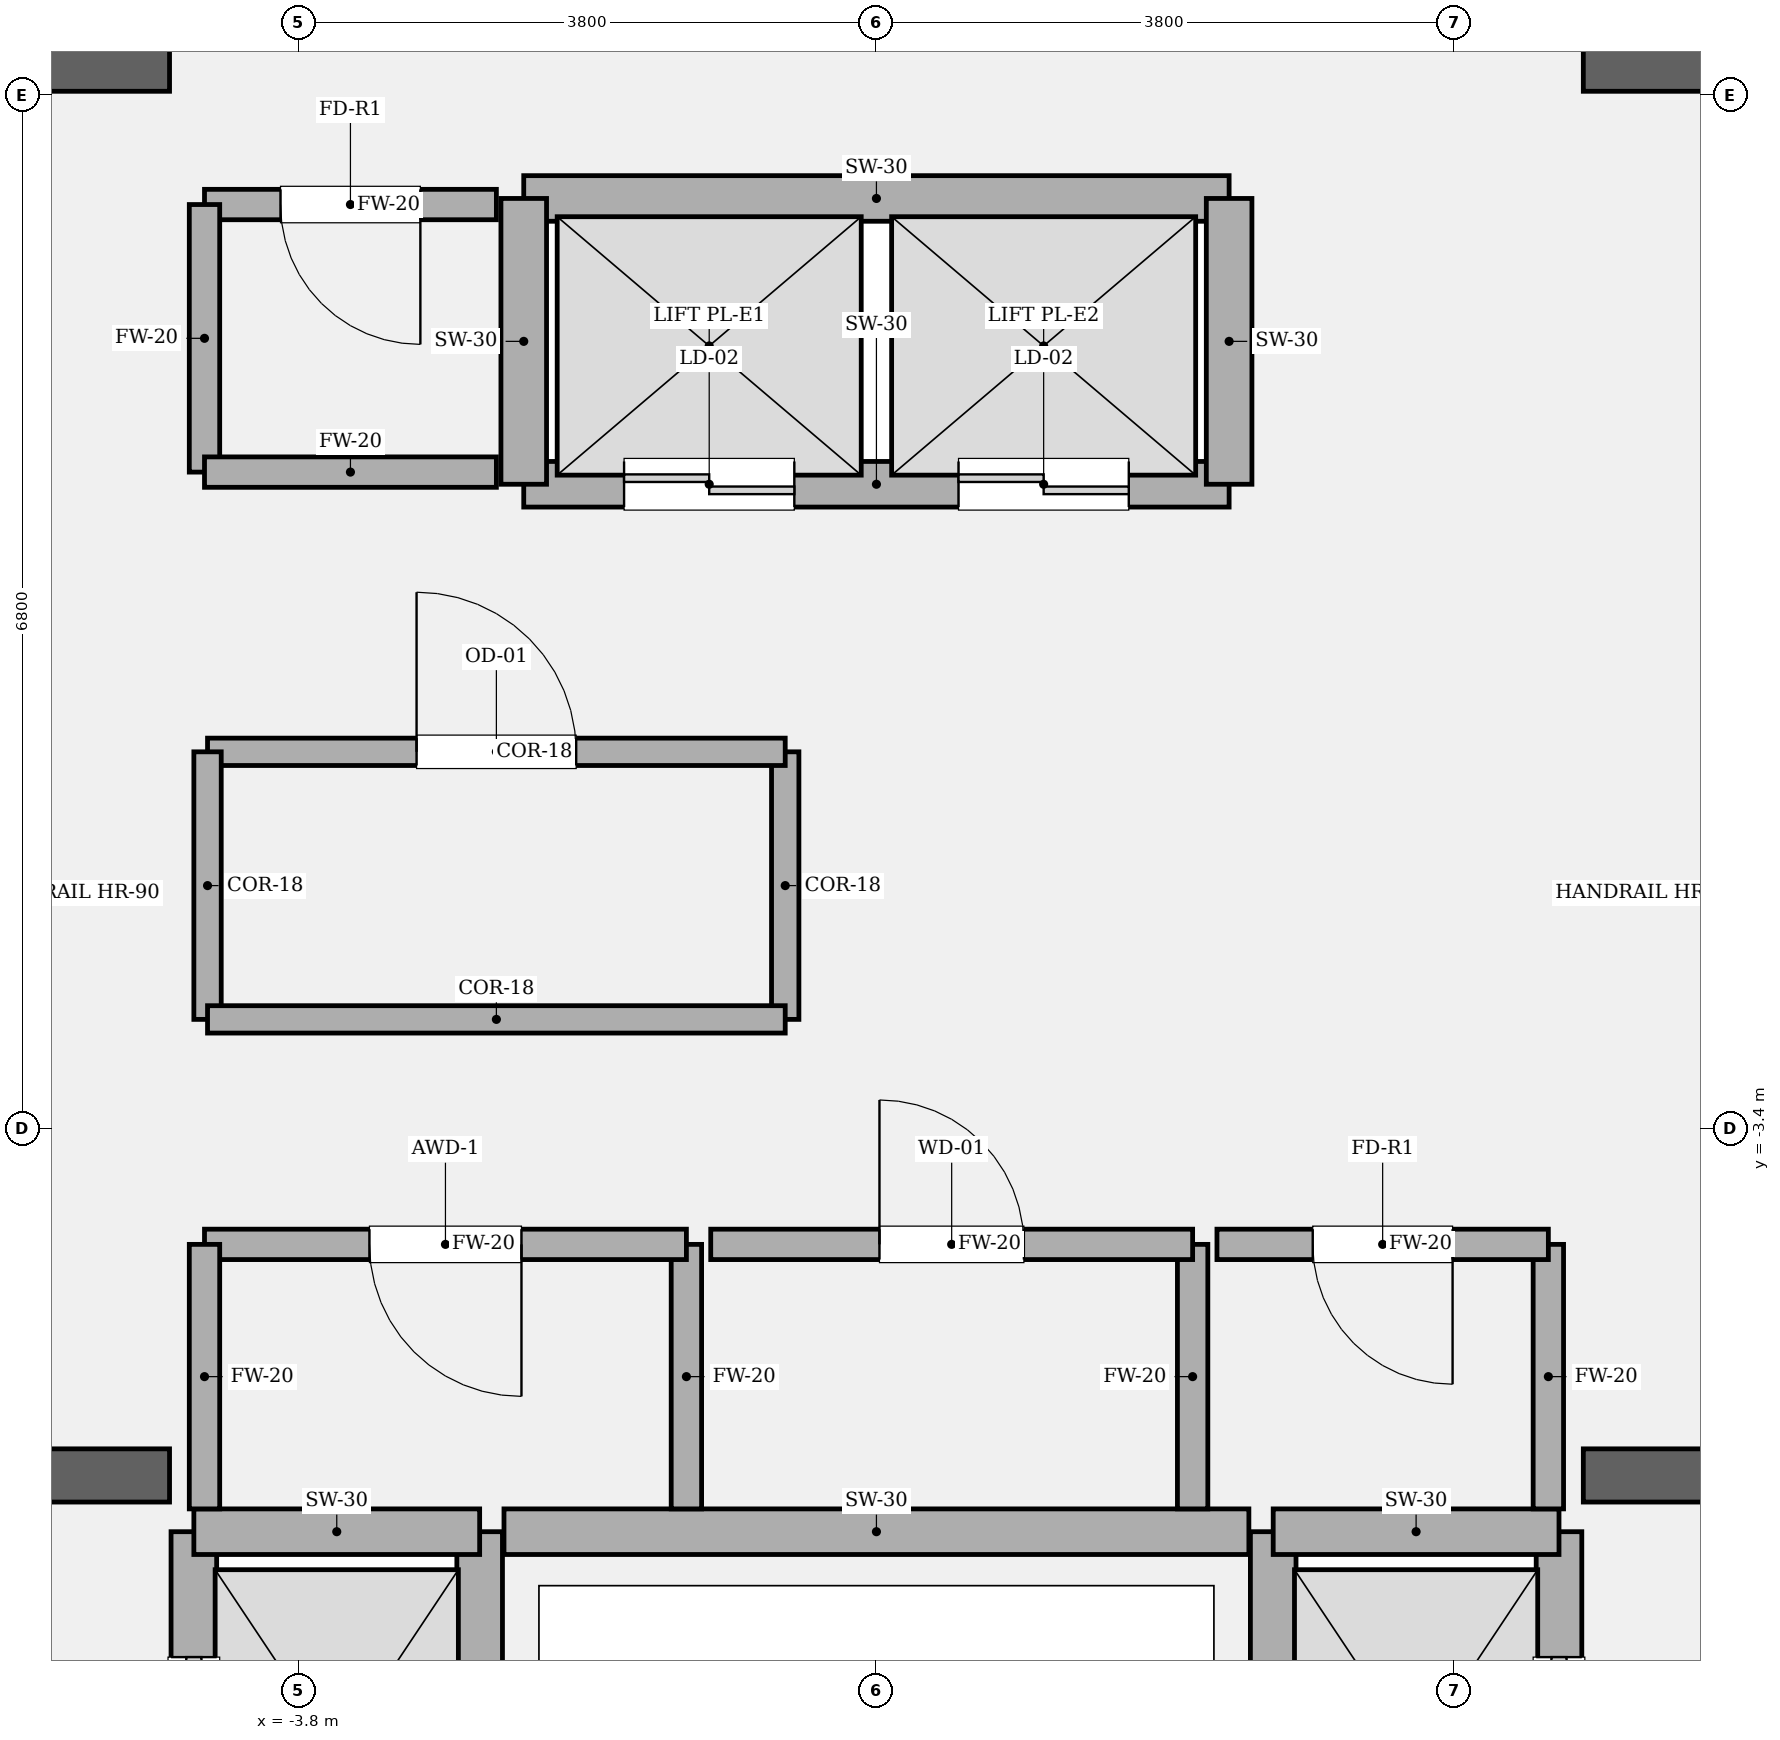
"""IFC4 building model, lengths in metres.
Left out: names, types, materials, properties, quantities, classifications, styles, units other than length and angle.
Written with IfcOpenShell. Run it as: python <this file> out.ifc"""

import sys

from ifc_helpers import new_model, si_unit, direction, frame, frame_2d, origin, place, context, subcontext, project, spatial, rectangle, extrude, element, fill, save


model = new_model("IFC4")
c1 = context("Model", 3, precision=1e-05, world=origin(), true_north=direction((0.0, 1.0)))
c2 = subcontext(c1, "Body", "Model", "MODEL_VIEW")
j1 = project(units=[si_unit("LENGTHUNIT", "METRE"), si_unit("PLANEANGLEUNIT", "RADIAN")], contexts=[c1])
p1 = place(None, origin())
s1 = spatial("IfcSite", under=j1, at=p1, CompositionType="ELEMENT")
p2 = place(p1, origin())
s2 = spatial("IfcBuilding", under=s1, at=p2, CompositionType="ELEMENT")
p3 = place(p2, frame((0.0, 0.0, 309.0)))
s3 = spatial("IfcBuildingStorey", under=s2, at=p3, CompositionType="ELEMENT", Elevation=309.0)
p4 = place(p3, frame((-9.925, -5.68, 0.0), z_axis=(0.0, 0.0, 1.0), x_axis=(1.0, 0.0, 0.0)))
e1 = element("IfcWall", 1, at=p4, inside=s3, PredefinedType="SOLIDWALL", context=c2, shape_type="SweptSolid", body=[
    extrude(rectangle(XDim=5.275, YDim=0.35, at=frame_2d((2.638, 0.0))), origin(), (0.0, 0.0, 1.0), 4.2),
])
p5 = place(p4, frame((1.385, 0.0, 0.0)))
e2 = element("IfcOpeningElement", 2, at=p5, cuts=e1, PredefinedType="OPENING", context=c2, shape_type="SweptSolid", body=[
    extrude(rectangle(XDim=1.18, YDim=2.2, at=frame_2d((0.59, 1.1))), frame((0.0, 0.185, 0.0), z_axis=(0.0, -1.0, 0.0), x_axis=(1.0, 0.0, 0.0)), (0.0, 0.0, 1.0), 0.37),
])
p6 = place(p3, frame((4.65, -5.68, 0.0), z_axis=(0.0, 0.0, 1.0), x_axis=(1.0, 0.0, 0.0)))
e3 = element("IfcWall", 3, at=p6, inside=s3, PredefinedType="SOLIDWALL", context=c2, shape_type="SweptSolid", body=[
    extrude(rectangle(XDim=5.275, YDim=0.35, at=frame_2d((2.638, 0.0))), origin(), (0.0, 0.0, 1.0), 4.2),
])
p7 = place(p6, frame((2.71, 0.0, 0.0)))
e4 = element("IfcOpeningElement", 4, at=p7, cuts=e3, PredefinedType="OPENING", context=c2, shape_type="SweptSolid", body=[
    extrude(rectangle(XDim=1.18, YDim=2.2, at=frame_2d((0.59, 1.1))), frame((0.0, 0.185, 0.0), z_axis=(0.0, -1.0, 0.0), x_axis=(1.0, 0.0, 0.0)), (0.0, 0.0, 1.0), 0.37),
])
for number, where, z_axis, x_axis in (
    (5, (-9.925, 3.6, 0.0), (0.0, 0.0, 1.0), (1.0, 0.0, 0.0)),
    (6, (4.65, 3.6, 0.0), (0.0, 0.0, 1.0), (1.0, 0.0, 0.0)),
):
    element("IfcWall", number, at=place(p3, frame(where, z_axis=z_axis, x_axis=x_axis)), inside=s3, PredefinedType="SOLIDWALL", context=c2, shape_type="SweptSolid", body=[
        extrude(rectangle(XDim=5.275, YDim=0.35, at=frame_2d((2.638, 0.0))), origin(), (0.0, 0.0, 1.0), 4.2),
    ])
p8 = place(p3, frame((-4.49, -8.82, 0.0), z_axis=(0.0, 0.0, 1.0), x_axis=(0.0, 1.0, 0.0)))
e7 = element("IfcWall", 7, at=p8, inside=s3, PredefinedType="SOLIDWALL", context=c2, shape_type="SweptSolid", body=[
    extrude(rectangle(XDim=2.77, YDim=0.3, at=frame_2d((1.385, 0.0))), origin(), (0.0, 0.0, 1.0), 4.0),
])
p9 = place(p8, frame((0.825, 0.0, 0.0)))
e8 = element("IfcOpeningElement", 8, at=p9, cuts=e7, PredefinedType="OPENING", context=c2, shape_type="SweptSolid", body=[
    extrude(rectangle(XDim=1.12, YDim=2.25, at=frame_2d((0.56, 1.125))), frame((0.0, 0.16, 0.0), z_axis=(0.0, -1.0, 0.0), x_axis=(1.0, 0.0, 0.0)), (0.0, 0.0, 1.0), 0.32),
])
p10 = place(p3, frame((-2.61, -8.82, 0.0), z_axis=(0.0, 0.0, 1.0), x_axis=(0.0, 1.0, 0.0)))
e9 = element("IfcWall", 9, at=p10, inside=s3, PredefinedType="SOLIDWALL", context=c2, shape_type="SweptSolid", body=[
    extrude(rectangle(XDim=2.77, YDim=0.3, at=frame_2d((1.385, 0.0))), origin(), (0.0, 0.0, 1.0), 4.0),
])
p11 = place(p3, frame((-4.49, -6.05, 0.0), z_axis=(0.0, 0.0, 1.0), x_axis=(1.0, 0.0, 0.0)))
e10 = element("IfcWall", 10, at=p11, inside=s3, PredefinedType="SOLIDWALL", context=c2, shape_type="SweptSolid", body=[
    extrude(rectangle(XDim=1.88, YDim=0.3, at=frame_2d((0.94, 0.0))), origin(), (0.0, 0.0, 1.0), 4.0),
])
p12 = place(p3, frame((4.49, -8.82, 0.0), z_axis=(0.0, 0.0, 1.0), x_axis=(0.0, 1.0, 0.0)))
e11 = element("IfcWall", 11, at=p12, inside=s3, PredefinedType="SOLIDWALL", context=c2, shape_type="SweptSolid", body=[
    extrude(rectangle(XDim=2.77, YDim=0.3, at=frame_2d((1.385, 0.0))), origin(), (0.0, 0.0, 1.0), 4.0),
])
p13 = place(p12, frame((0.825, 0.0, 0.0)))
e12 = element("IfcOpeningElement", 12, at=p13, cuts=e11, PredefinedType="OPENING", context=c2, shape_type="SweptSolid", body=[
    extrude(rectangle(XDim=1.12, YDim=2.25, at=frame_2d((0.56, 1.125))), frame((0.0, 0.16, 0.0), z_axis=(0.0, -1.0, 0.0), x_axis=(1.0, 0.0, 0.0)), (0.0, 0.0, 1.0), 0.32),
])
p14 = place(p3, frame((2.61, -8.82, 0.0), z_axis=(0.0, 0.0, 1.0), x_axis=(0.0, 1.0, 0.0)))
e13 = element("IfcWall", 13, at=p14, inside=s3, PredefinedType="SOLIDWALL", context=c2, shape_type="SweptSolid", body=[
    extrude(rectangle(XDim=2.77, YDim=0.3, at=frame_2d((1.385, 0.0))), origin(), (0.0, 0.0, 1.0), 4.0),
])
p15 = place(p3, frame((2.61, -6.05, 0.0), z_axis=(0.0, 0.0, 1.0), x_axis=(1.0, 0.0, 0.0)))
e14 = element("IfcWall", 14, at=p15, inside=s3, PredefinedType="SOLIDWALL", context=c2, shape_type="SweptSolid", body=[
    extrude(rectangle(XDim=1.88, YDim=0.3, at=frame_2d((0.94, 0.0))), origin(), (0.0, 0.0, 1.0), 4.0),
])
p16 = place(p3, frame((-2.32, 0.84, 0.0), z_axis=(0.0, 0.0, 1.0), x_axis=(1.0, 0.0, 0.0)))
e15 = element("IfcWall", 15, at=p16, inside=s3, PredefinedType="SOLIDWALL", context=c2, shape_type="SweptSolid", body=[
    extrude(rectangle(XDim=4.64, YDim=0.3, at=frame_2d((2.32, 0.0))), origin(), (0.0, 0.0, 1.0), 4.0),
])
p17 = place(p16, frame((0.66, 0.0, 0.0)))
e16 = element("IfcOpeningElement", 16, at=p17, cuts=e15, PredefinedType="OPENING", context=c2, shape_type="SweptSolid", body=[
    extrude(rectangle(XDim=1.12, YDim=2.25, at=frame_2d((0.56, 1.125))), frame((0.0, 0.16, 0.0), z_axis=(0.0, -1.0, 0.0), x_axis=(1.0, 0.0, 0.0)), (0.0, 0.0, 1.0), 0.32),
])
p18 = place(p16, frame((2.86, 0.0, 0.0)))
e17 = element("IfcOpeningElement", 17, at=p18, cuts=e15, PredefinedType="OPENING", context=c2, shape_type="SweptSolid", body=[
    extrude(rectangle(XDim=1.12, YDim=2.25, at=frame_2d((0.56, 1.125))), frame((0.0, 0.16, 0.0), z_axis=(0.0, -1.0, 0.0), x_axis=(1.0, 0.0, 0.0)), (0.0, 0.0, 1.0), 0.32),
])
p19 = place(p3, frame((-2.32, 2.72, 0.0), z_axis=(0.0, 0.0, 1.0), x_axis=(1.0, 0.0, 0.0)))
e18 = element("IfcWall", 18, at=p19, inside=s3, PredefinedType="SOLIDWALL", context=c2, shape_type="SweptSolid", body=[
    extrude(rectangle(XDim=4.64, YDim=0.3, at=frame_2d((2.32, 0.0))), origin(), (0.0, 0.0, 1.0), 4.0),
])
for number, where, z_axis, x_axis in (
    (19, (-2.32, 0.84, 0.0), (0.0, 0.0, 1.0), (0.0, 1.0, 0.0)),
    (20, (2.32, 0.84, 0.0), (0.0, 0.0, 1.0), (0.0, 1.0, 0.0)),
):
    element("IfcWall", number, at=place(p3, frame(where, z_axis=z_axis, x_axis=x_axis)), inside=s3, PredefinedType="SOLIDWALL", context=c2, shape_type="SweptSolid", body=[
        extrude(rectangle(XDim=1.88, YDim=0.3, at=frame_2d((0.94, 0.0))), origin(), (0.0, 0.0, 1.0), 4.0),
    ])
p20 = place(p3, frame((-2.45, -6.05, 0.0), z_axis=(0.0, 0.0, 1.0), x_axis=(1.0, 0.0, 0.0)))
e21 = element("IfcWall", 21, at=p20, inside=s3, PredefinedType="SOLIDWALL", context=c2, shape_type="SweptSolid", body=[
    extrude(rectangle(XDim=4.9, YDim=0.3, at=frame_2d((2.45, 0.0))), origin(), (0.0, 0.0, 1.0), 4.0),
])
p21 = place(p3, frame((-1.25, -5.9, 0.0), z_axis=(0.0, 0.0, 1.0), x_axis=(0.0, 1.0, 0.0)))
e22 = element("IfcWall", 22, at=p21, inside=s3, PredefinedType="SOLIDWALL", context=c2, shape_type="SweptSolid", body=[
    extrude(rectangle(XDim=1.74, YDim=0.2, at=frame_2d((0.87, 0.0))), origin(), (0.0, 0.0, 1.0), 4.0),
])
p22 = place(p3, frame((-1.25, -4.16, 0.0), z_axis=(0.0, 0.0, 1.0), x_axis=(-1.0, 0.0, 0.0)))
e23 = element("IfcWall", 23, at=p22, inside=s3, PredefinedType="SOLIDWALL", context=c2, shape_type="SweptSolid", body=[
    extrude(rectangle(XDim=3.17, YDim=0.2, at=frame_2d((1.585, 0.0))), origin(), (0.0, 0.0, 1.0), 4.0),
])
p23 = place(p22, frame((1.085, 0.0, 0.0)))
e24 = element("IfcOpeningElement", 24, at=p23, cuts=e23, PredefinedType="OPENING", context=c2, shape_type="SweptSolid", body=[
    extrude(rectangle(XDim=1.0, YDim=2.15, at=frame_2d((0.5, 1.075))), frame((0.0, 0.11, 0.0), z_axis=(0.0, -1.0, 0.0), x_axis=(1.0, 0.0, 0.0)), (0.0, 0.0, 1.0), 0.22),
])
for number, where, z_axis, x_axis in (
    (25, (-4.42, -4.16, 0.0), (0.0, 0.0, 1.0), (0.0, -1.0, 0.0)),
    (26, (2.08, -5.9, 0.0), (0.0, 0.0, 1.0), (0.0, 1.0, 0.0)),
):
    element("IfcWall", number, at=place(p3, frame(where, z_axis=z_axis, x_axis=x_axis)), inside=s3, PredefinedType="SOLIDWALL", context=c2, shape_type="SweptSolid", body=[
        extrude(rectangle(XDim=1.74, YDim=0.2, at=frame_2d((0.87, 0.0))), origin(), (0.0, 0.0, 1.0), 4.0),
    ])
p24 = place(p3, frame((2.08, -4.16, 0.0), z_axis=(0.0, 0.0, 1.0), x_axis=(-1.0, 0.0, 0.0)))
e27 = element("IfcWall", 27, at=p24, inside=s3, PredefinedType="SOLIDWALL", context=c2, shape_type="SweptSolid", body=[
    extrude(rectangle(XDim=3.17, YDim=0.2, at=frame_2d((1.585, 0.0))), origin(), (0.0, 0.0, 1.0), 4.0),
])
p25 = place(p24, frame((1.11, 0.0, 0.0)))
e28 = element("IfcOpeningElement", 28, at=p25, cuts=e27, PredefinedType="OPENING", context=c2, shape_type="SweptSolid", body=[
    extrude(rectangle(XDim=0.95, YDim=2.15, at=frame_2d((0.475, 1.075))), frame((0.0, 0.11, 0.0), z_axis=(0.0, -1.0, 0.0), x_axis=(1.0, 0.0, 0.0)), (0.0, 0.0, 1.0), 0.22),
])
p26 = place(p3, frame((4.42, -5.9, 0.0), z_axis=(0.0, 0.0, 1.0), x_axis=(0.0, 1.0, 0.0)))
e29 = element("IfcWall", 29, at=p26, inside=s3, PredefinedType="SOLIDWALL", context=c2, shape_type="SweptSolid", body=[
    extrude(rectangle(XDim=1.74, YDim=0.2, at=frame_2d((0.87, 0.0))), origin(), (0.0, 0.0, 1.0), 4.0),
])
p27 = place(p3, frame((4.42, -4.16, 0.0), z_axis=(0.0, 0.0, 1.0), x_axis=(-1.0, 0.0, 0.0)))
e30 = element("IfcWall", 30, at=p27, inside=s3, PredefinedType="SOLIDWALL", context=c2, shape_type="SweptSolid", body=[
    extrude(rectangle(XDim=2.18, YDim=0.2, at=frame_2d((1.09, 0.0))), origin(), (0.0, 0.0, 1.0), 4.0),
])
p28 = place(p27, frame((0.63, 0.0, 0.0)))
e31 = element("IfcOpeningElement", 31, at=p28, cuts=e30, PredefinedType="OPENING", context=c2, shape_type="SweptSolid", body=[
    extrude(rectangle(XDim=0.92, YDim=2.1, at=frame_2d((0.46, 1.05))), frame((0.0, 0.11, 0.0), z_axis=(0.0, -1.0, 0.0), x_axis=(1.0, 0.0, 0.0)), (0.0, 0.0, 1.0), 0.22),
])
p29 = place(p3, frame((-0.6, -2.68, 0.0), z_axis=(0.0, 0.0, 1.0), x_axis=(0.0, 1.0, 0.0)))
e32 = element("IfcWall", 32, at=p29, inside=s3, PredefinedType="PARTITIONING", context=c2, shape_type="SweptSolid", body=[
    extrude(rectangle(XDim=1.76, YDim=0.18, at=frame_2d((0.88, 0.0))), origin(), (0.0, 0.0, 1.0), 4.0),
])
p30 = place(p3, frame((-0.6, -0.92, 0.0), z_axis=(0.0, 0.0, 1.0), x_axis=(-1.0, 0.0, 0.0)))
e33 = element("IfcWall", 33, at=p30, inside=s3, PredefinedType="PARTITIONING", context=c2, shape_type="SweptSolid", body=[
    extrude(rectangle(XDim=3.8, YDim=0.18, at=frame_2d((1.9, 0.0))), origin(), (0.0, 0.0, 1.0), 4.0),
])
p31 = place(p30, frame((1.375, 0.0, 0.0)))
e34 = element("IfcOpeningElement", 34, at=p31, cuts=e33, PredefinedType="OPENING", context=c2, shape_type="SweptSolid", body=[
    extrude(rectangle(XDim=1.05, YDim=2.2, at=frame_2d((0.525, 1.1))), frame((0.0, 0.1, 0.0), z_axis=(0.0, -1.0, 0.0), x_axis=(1.0, 0.0, 0.0)), (0.0, 0.0, 1.0), 0.2),
])
p32 = place(p3, frame((-4.4, -0.92, 0.0), z_axis=(0.0, 0.0, 1.0), x_axis=(0.0, -1.0, 0.0)))
e35 = element("IfcWall", 35, at=p32, inside=s3, PredefinedType="PARTITIONING", context=c2, shape_type="SweptSolid", body=[
    extrude(rectangle(XDim=1.76, YDim=0.18, at=frame_2d((0.88, 0.0))), origin(), (0.0, 0.0, 1.0), 4.0),
])
p33 = place(p3, frame((-4.4, -2.68, 0.0), z_axis=(0.0, 0.0, 1.0), x_axis=(1.0, 0.0, 0.0)))
e36 = element("IfcWall", 36, at=p33, inside=s3, PredefinedType="PARTITIONING", context=c2, shape_type="SweptSolid", body=[
    extrude(rectangle(XDim=3.8, YDim=0.18, at=frame_2d((1.9, 0.0))), origin(), (0.0, 0.0, 1.0), 4.0),
])
p34 = place(p3, frame((-2.5, 2.68, 0.0), z_axis=(0.0, 0.0, 1.0), x_axis=(-1.0, 0.0, 0.0)))
e37 = element("IfcWall", 37, at=p34, inside=s3, PredefinedType="SOLIDWALL", context=c2, shape_type="SweptSolid", body=[
    extrude(rectangle(XDim=1.92, YDim=0.2, at=frame_2d((0.96, 0.0))), origin(), (0.0, 0.0, 1.0), 4.0),
])
p35 = place(p34, frame((0.5, 0.0, 0.0)))
e38 = element("IfcOpeningElement", 38, at=p35, cuts=e37, PredefinedType="OPENING", context=c2, shape_type="SweptSolid", body=[
    extrude(rectangle(XDim=0.92, YDim=2.1, at=frame_2d((0.46, 1.05))), frame((0.0, 0.11, 0.0), z_axis=(0.0, -1.0, 0.0), x_axis=(1.0, 0.0, 0.0)), (0.0, 0.0, 1.0), 0.22),
])
p36 = place(p3, frame((-4.42, 2.68, 0.0), z_axis=(0.0, 0.0, 1.0), x_axis=(0.0, -1.0, 0.0)))
e39 = element("IfcWall", 39, at=p36, inside=s3, PredefinedType="SOLIDWALL", context=c2, shape_type="SweptSolid", body=[
    extrude(rectangle(XDim=1.76, YDim=0.2, at=frame_2d((0.88, 0.0))), origin(), (0.0, 0.0, 1.0), 4.0),
])
p37 = place(p3, frame((-4.42, 0.92, 0.0), z_axis=(0.0, 0.0, 1.0), x_axis=(1.0, 0.0, 0.0)))
e40 = element("IfcWall", 40, at=p37, inside=s3, PredefinedType="SOLIDWALL", context=c2, shape_type="SweptSolid", body=[
    extrude(rectangle(XDim=1.92, YDim=0.2, at=frame_2d((0.96, 0.0))), origin(), (0.0, 0.0, 1.0), 4.0),
])
p38 = place(p9, origin())
e41 = element("IfcDoor", 41, at=p38, inside=s3, OperationType="SLIDING_TO_LEFT", PredefinedType="DOOR", context=c2, shape_type="SweptSolid", body=[
    extrude(rectangle(XDim=1.12, YDim=2.25, at=frame_2d((0.56, 1.125))), frame((0.0, 0.025, 0.0), z_axis=(0.0, -1.0, 0.0), x_axis=(1.0, 0.0, 0.0)), (0.0, 0.0, 1.0), 0.05),
])
fill(e8, e41)
p39 = place(p13, origin())
e42 = element("IfcDoor", 42, at=p39, inside=s3, OperationType="SLIDING_TO_RIGHT", PredefinedType="DOOR", context=c2, shape_type="SweptSolid", body=[
    extrude(rectangle(XDim=1.12, YDim=2.25, at=frame_2d((0.56, 1.125))), frame((0.0, 0.025, 0.0), z_axis=(0.0, -1.0, 0.0), x_axis=(1.0, 0.0, 0.0)), (0.0, 0.0, 1.0), 0.05),
])
fill(e12, e42)
p40 = place(p17, origin())
e43 = element("IfcDoor", 43, at=p40, inside=s3, OperationType="DOUBLE_DOOR_SLIDING", PredefinedType="DOOR", context=c2, shape_type="SweptSolid", body=[
    extrude(rectangle(XDim=1.12, YDim=2.25, at=frame_2d((0.56, 1.125))), frame((0.0, 0.025, 0.0), z_axis=(0.0, -1.0, 0.0), x_axis=(1.0, 0.0, 0.0)), (0.0, 0.0, 1.0), 0.05),
])
fill(e16, e43)
p41 = place(p18, origin())
e44 = element("IfcDoor", 44, at=p41, inside=s3, OperationType="DOUBLE_DOOR_SLIDING", PredefinedType="DOOR", context=c2, shape_type="SweptSolid", body=[
    extrude(rectangle(XDim=1.12, YDim=2.25, at=frame_2d((0.56, 1.125))), frame((0.0, 0.025, 0.0), z_axis=(0.0, -1.0, 0.0), x_axis=(1.0, 0.0, 0.0)), (0.0, 0.0, 1.0), 0.05),
])
fill(e17, e44)
p42 = place(p23, origin())
e45 = element("IfcDoor", 45, at=p42, inside=s3, OperationType="SINGLE_SWING_LEFT", PredefinedType="DOOR", context=c2, shape_type="SweptSolid", body=[
    extrude(rectangle(XDim=1.0, YDim=2.15, at=frame_2d((0.5, 1.075))), frame((0.0, 0.025, 0.0), z_axis=(0.0, -1.0, 0.0), x_axis=(1.0, 0.0, 0.0)), (0.0, 0.0, 1.0), 0.05),
])
fill(e24, e45)
p43 = place(p25, origin())
e46 = element("IfcDoor", 46, at=p43, inside=s3, OperationType="SINGLE_SWING_RIGHT", PredefinedType="DOOR", context=c2, shape_type="SweptSolid", body=[
    extrude(rectangle(XDim=0.95, YDim=2.15, at=frame_2d((0.475, 1.075))), frame((0.0, 0.025, 0.0), z_axis=(0.0, -1.0, 0.0), x_axis=(1.0, 0.0, 0.0)), (0.0, 0.0, 1.0), 0.05),
])
fill(e28, e46)
p44 = place(p28, origin())
e47 = element("IfcDoor", 47, at=p44, inside=s3, OperationType="SINGLE_SWING_LEFT", PredefinedType="DOOR", context=c2, shape_type="SweptSolid", body=[
    extrude(rectangle(XDim=0.92, YDim=2.1, at=frame_2d((0.46, 1.05))), frame((0.0, 0.025, 0.0), z_axis=(0.0, -1.0, 0.0), x_axis=(1.0, 0.0, 0.0)), (0.0, 0.0, 1.0), 0.05),
])
fill(e31, e47)
p45 = place(p31, origin())
e48 = element("IfcDoor", 48, at=p45, inside=s3, OperationType="SINGLE_SWING_RIGHT", PredefinedType="DOOR", context=c2, shape_type="SweptSolid", body=[
    extrude(rectangle(XDim=1.05, YDim=2.2, at=frame_2d((0.525, 1.1))), frame((0.0, 0.025, 0.0), z_axis=(0.0, -1.0, 0.0), x_axis=(1.0, 0.0, 0.0)), (0.0, 0.0, 1.0), 0.05),
])
fill(e34, e48)
p46 = place(p35, origin())
e49 = element("IfcDoor", 49, at=p46, inside=s3, OperationType="SINGLE_SWING_LEFT", PredefinedType="DOOR", context=c2, shape_type="SweptSolid", body=[
    extrude(rectangle(XDim=0.92, YDim=2.1, at=frame_2d((0.46, 1.05))), frame((0.0, 0.025, 0.0), z_axis=(0.0, -1.0, 0.0), x_axis=(1.0, 0.0, 0.0)), (0.0, 0.0, 1.0), 0.05),
])
fill(e38, e49)
save(model, sys.argv[1])
